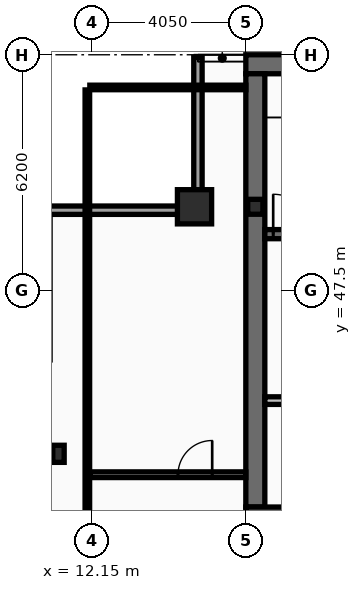
"""IFC4 building model, lengths in metres.
Left out: names, types, materials, properties, quantities, classifications, styles, units other than length and angle.
Written with IfcOpenShell. Run it as: python <this file> out.ifc"""

import sys

from ifc_helpers import new_model, si_unit, direction, frame, frame_2d, origin, origin_2d, place, context, subcontext, project, spatial, rectangle, hollow_rectangle, i_section, extrude, element, fill, save


model = new_model("IFC4")
c1 = context("Model", 3, precision=1e-05, world=origin(), true_north=direction((0.0, 1.0)))
c2 = subcontext(c1, "Body", "Model", "MODEL_VIEW")
j1 = project(units=[si_unit("LENGTHUNIT", "METRE"), si_unit("PLANEANGLEUNIT", "RADIAN")], contexts=[c1])
p1 = place(None, origin())
s1 = spatial("IfcSite", under=j1, at=p1, CompositionType="ELEMENT")
p2 = place(p1, origin())
s2 = spatial("IfcBuilding", under=s1, at=p2, CompositionType="ELEMENT")
p3 = place(p2, frame((0.0, 0.0, 314.6)))
s3 = spatial("IfcBuildingStorey", under=s2, at=p3, CompositionType="ELEMENT", Elevation=314.6)
p4 = place(p3, frame((16.2, 53.45, 0.0), z_axis=(0.0, 0.0, 1.0), x_axis=(1.0, 0.0, 0.0)))
e1 = element("IfcWall", 1, at=p4, inside=s3, PredefinedType="SHEAR", context=c2, shape_type="SweptSolid", body=[
    extrude(rectangle(XDim=40.5, YDim=0.5, at=frame_2d((20.25, 0.0))), origin(), (0.0, 0.0, 1.0), 3.44),
])
p5 = place(p3, frame((16.45, 41.8, 0.0), z_axis=(0.0, 0.0, 1.0), x_axis=(0.0, 1.0, 0.0)))
e2 = element("IfcWall", 2, at=p5, inside=s3, PredefinedType="SHEAR", context=c2, shape_type="SweptSolid", body=[
    extrude(rectangle(XDim=11.4, YDim=0.5, at=frame_2d((5.7, 0.0))), origin(), (0.0, 0.0, 1.0), 3.44),
])
p6 = place(p3, frame((18.65, 41.55, 0.0), z_axis=(0.0, 0.0, 1.0), x_axis=(-1.0, 0.0, 0.0)))
e3 = element("IfcWall", 3, at=p6, inside=s3, PredefinedType="SHEAR", context=c2, shape_type="SweptSolid", body=[
    extrude(rectangle(XDim=2.45, YDim=0.5, at=frame_2d((1.225, 0.0))), origin(), (0.0, 0.0, 1.0), 3.44),
])
p7 = place(p3, frame((16.7, 48.98, 0.0), z_axis=(0.0, 0.0, 1.0), x_axis=(1.0, 0.0, 0.0)))
e4 = element("IfcWall", 4, at=p7, inside=s3, PredefinedType="SHEAR", context=c2, shape_type="SweptSolid", body=[
    extrude(rectangle(XDim=7.52, YDim=0.24, at=frame_2d((3.76, 0.0))), origin(), (0.0, 0.0, 1.0), 3.44),
])
p8 = place(p7, frame((0.22, 0.0, 0.0)))
e5 = element("IfcOpeningElement", 5, at=p8, cuts=e4, PredefinedType="OPENING", context=c2, shape_type="SweptSolid", body=[
    extrude(rectangle(XDim=1.05, YDim=2.15, at=frame_2d((0.525, 1.075))), frame((0.0, 0.13, 0.0), z_axis=(0.0, -1.0, 0.0), x_axis=(1.0, 0.0, 0.0)), (0.0, 0.0, 1.0), 0.26),
])
p9 = place(p3, frame((14.85, 49.7, 0.0), z_axis=(0.0, 0.0, 1.0), x_axis=(1.0, 0.0, 0.0)))
e6 = element("IfcColumn", 6, at=p9, inside=s3, PredefinedType="COLUMN", context=c2, shape_type="SweptSolid", body=[
    extrude(hollow_rectangle(XDim=0.9, YDim=0.9, WallThickness=0.05, at=origin_2d()), origin(), (0.0, 0.0, 1.0), 3.6),
])
p10 = place(p3, frame((11.27, 43.2, 0.0), z_axis=(0.0, 0.0, 1.0), x_axis=(1.0, 0.0, 0.0)))
e7 = element("IfcColumn", 7, at=p10, inside=s3, PredefinedType="COLUMN", context=c2, shape_type="SweptSolid", body=[
    extrude(i_section(OverallWidth=0.3, OverallDepth=0.45, WebThickness=0.014, FlangeThickness=0.026, at=origin_2d()), origin(), (0.0, 0.0, 1.0), 3.6),
])
p11 = place(p3, frame((16.45, 49.7, 0.0), z_axis=(0.0, 0.0, 1.0), x_axis=(1.0, 0.0, 0.0)))
e8 = element("IfcColumn", 8, at=p11, inside=s3, PredefinedType="COLUMN", context=c2, shape_type="SweptSolid", body=[
    extrude(i_section(OverallWidth=0.399, OverallDepth=0.393, WebThickness=0.023, FlangeThickness=0.037, at=origin_2d()), origin(), (0.0, 0.0, 1.0), 3.6),
])
p12 = place(p3, frame((10.83, 49.61, 0.0), z_axis=(0.0, 0.0, 1.0), x_axis=(1.0, 0.0, 0.0)))
e9 = element("IfcWall", 9, at=p12, inside=s3, PredefinedType="SOLIDWALL", context=c2, shape_type="SweptSolid", body=[
    extrude(rectangle(XDim=4.22, YDim=0.22, at=frame_2d((2.11, 0.0))), origin(), (0.0, 0.0, 1.0), 2.88),
])
p13 = place(p3, frame((14.94, 49.72, 0.0), z_axis=(0.0, 0.0, 1.0), x_axis=(0.0, 1.0, 0.0)))
e10 = element("IfcWall", 10, at=p13, inside=s3, PredefinedType="SOLIDWALL", context=c2, shape_type="SweptSolid", body=[
    extrude(rectangle(XDim=3.91, YDim=0.22, at=frame_2d((1.955, 0.0))), origin(), (0.0, 0.0, 1.0), 2.88),
])
p14 = place(p3, frame((16.7, 44.6, 0.0), z_axis=(0.0, 0.0, 1.0), x_axis=(1.0, 0.0, 0.0)))
e11 = element("IfcWall", 11, at=p14, inside=s3, PredefinedType="PARTITIONING", context=c2, shape_type="SweptSolid", body=[
    extrude(rectangle(XDim=4.3, YDim=0.2, at=frame_2d((2.15, 0.0))), origin(), (0.0, 0.0, 1.0), 3.44),
])
p15 = place(p14, frame((1.25, 0.0, 0.0)))
e12 = element("IfcOpeningElement", 12, at=p15, cuts=e11, PredefinedType="OPENING", context=c2, shape_type="SweptSolid", body=[
    extrude(rectangle(XDim=1.05, YDim=2.15, at=frame_2d((0.525, 1.075))), frame((0.0, 0.11, 0.0), z_axis=(0.0, -1.0, 0.0), x_axis=(1.0, 0.0, 0.0)), (0.0, 0.0, 1.0), 0.22),
])
p16 = place(p3, frame((12.095, 42.65, 0.0), z_axis=(0.0, 0.0, 1.0), x_axis=(1.0, 0.0, 0.0)))
e13 = element("IfcWall", 13, at=p16, inside=s3, PredefinedType="PARTITIONING", context=c2, shape_type="SweptSolid", body=[
    extrude(rectangle(XDim=4.105, YDim=0.15, at=frame_2d((2.052, 0.0))), origin(), (0.0, 0.0, 1.0), 2.83),
])
p17 = place(p16, frame((2.32, 0.0, 0.0)))
e14 = element("IfcOpeningElement", 14, at=p17, cuts=e13, PredefinedType="OPENING", context=c2, shape_type="SweptSolid", body=[
    extrude(rectangle(XDim=0.9, YDim=2.05, at=frame_2d((0.45, 1.025))), frame((0.0, 0.085, 0.0), z_axis=(0.0, -1.0, 0.0), x_axis=(1.0, 0.0, 0.0)), (0.0, 0.0, 1.0), 0.17),
])
p18 = place(p3, frame((12.03, 10.665, 0.0), z_axis=(0.0, 0.0, 1.0), x_axis=(0.0, 1.0, 0.0)))
e15 = element("IfcWall", 15, at=p18, inside=s3, PredefinedType="PARTITIONING", context=c2, shape_type="SweptSolid", body=[
    extrude(rectangle(XDim=42.11, YDim=0.12, at=frame_2d((21.055, 0.0))), origin(), (0.0, 0.0, 1.0), 2.83),
])
p19 = place(p3, frame((12.095, 52.84, 0.0), z_axis=(0.0, 0.0, 1.0), x_axis=(1.0, 0.0, 0.0)))
e16 = element("IfcWall", 16, at=p19, inside=s3, PredefinedType="PARTITIONING", context=c2, shape_type="SweptSolid", body=[
    extrude(rectangle(XDim=4.105, YDim=0.12, at=frame_2d((2.052, 0.0))), origin(), (0.0, 0.0, 1.0), 3.44),
])
p20 = place(p8, origin())
e17 = element("IfcDoor", 17, at=p20, inside=s3, OperationType="SINGLE_SWING_LEFT", PredefinedType="DOOR", context=c2, shape_type="SweptSolid", body=[
    extrude(rectangle(XDim=1.05, YDim=2.15, at=frame_2d((0.525, 1.075))), frame((0.0, 0.025, 0.0), z_axis=(0.0, -1.0, 0.0), x_axis=(1.0, 0.0, 0.0)), (0.0, 0.0, 1.0), 0.05),
])
fill(e5, e17)
p21 = place(p17, origin())
e18 = element("IfcDoor", 18, at=p21, inside=s3, OperationType="SINGLE_SWING_RIGHT", PredefinedType="DOOR", context=c2, shape_type="SweptSolid", body=[
    extrude(rectangle(XDim=0.9, YDim=2.05, at=frame_2d((0.45, 1.025))), frame((0.0, 0.025, 0.0), z_axis=(0.0, -1.0, 0.0), x_axis=(1.0, 0.0, 0.0)), (0.0, 0.0, 1.0), 0.05),
])
fill(e14, e18)
save(model, sys.argv[1])
